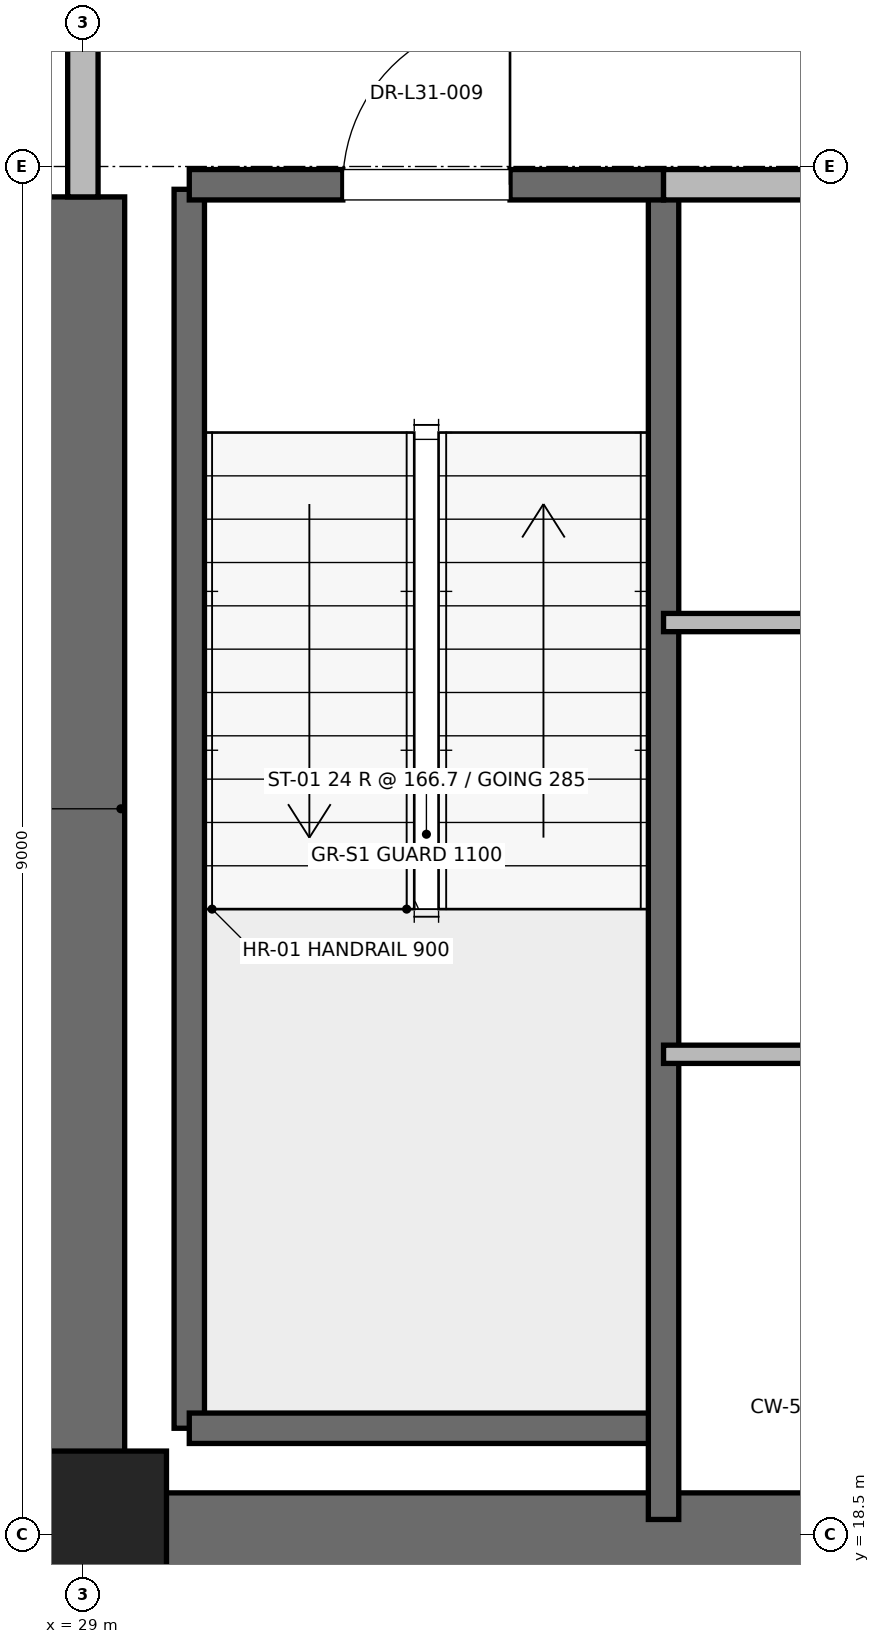
"""IFC4 building model, lengths in metres.
Left out: names, types, materials, properties, quantities, classifications, styles, units other than length and angle.
Written with IfcOpenShell. Run it as: python <this file> out.ifc"""

import sys

from ifc_helpers import new_model, si_unit, direction, frame, frame_2d, origin, origin_2d, place, context, subcontext, project, spatial, rectangle, extrude, element, fill, save


model = new_model("IFC4")
c1 = context("Model", 3, precision=1e-05, world=origin(), true_north=direction((0.0, 1.0)))
c2 = subcontext(c1, "Body", "Model", "MODEL_VIEW")
j1 = project(units=[si_unit("LENGTHUNIT", "METRE"), si_unit("PLANEANGLEUNIT", "RADIAN")], contexts=[c1])
p1 = place(None, origin())
s1 = spatial("IfcSite", under=j1, at=p1, CompositionType="ELEMENT")
p2 = place(p1, origin())
s2 = spatial("IfcBuilding", under=s1, at=p2, CompositionType="ELEMENT")
p3 = place(p2, frame((0.0, 0.0, 136.4)))
s3 = spatial("IfcBuildingStorey", under=s2, at=p3, CompositionType="ELEMENT", Elevation=136.4)
p4 = place(p3, frame((29.0, 18.5, 0.0), z_axis=(0.0, 0.0, 1.0), x_axis=(1.0, 0.0, 0.0)))
e1 = element("IfcColumn", 1, at=p4, inside=s3, PredefinedType="PILASTER", context=c2, shape_type="SweptSolid", body=[
    extrude(rectangle(XDim=1.1, YDim=1.1, at=origin_2d()), origin(), (0.0, 0.0, 1.0), 4.0),
])
p5 = place(p3, frame((29.0, 18.5, 0.0), z_axis=(0.0, 0.0, 1.0), x_axis=(1.0, 0.0, 0.0)))
e2 = element("IfcWall", 2, at=p5, inside=s3, PredefinedType="SHEAR", context=c2, shape_type="SweptSolid", body=[
    extrude(rectangle(XDim=9.2, YDim=0.55, at=frame_2d((4.6, 0.0))), origin(), (0.0, 0.0, 1.0), 3.775),
])
p6 = place(p3, frame((29.0, 18.5, 0.0), z_axis=(0.0, 0.0, 1.0), x_axis=(0.0, 1.0, 0.0)))
e3 = element("IfcWall", 3, at=p6, inside=s3, PredefinedType="SHEAR", context=c2, shape_type="SweptSolid", body=[
    extrude(rectangle(XDim=8.8, YDim=0.55, at=frame_2d((4.4, 0.0))), origin(), (0.0, 0.0, 1.0), 3.775),
])
p7 = place(p3, frame((29.7, 19.2, 0.0), z_axis=(0.0, 0.0, 1.0), x_axis=(0.0, 1.0, 0.0)))
e4 = element("IfcWall", 4, at=p7, inside=s3, PredefinedType="SOLIDWALL", context=c2, shape_type="SweptSolid", body=[
    extrude(rectangle(XDim=8.15, YDim=0.2, at=frame_2d((4.075, 0.0))), origin(), (0.0, 0.0, 1.0), 3.775),
])
p8 = place(p3, frame((29.7, 19.2, 0.0), z_axis=(0.0, 0.0, 1.0), x_axis=(1.0, 0.0, 0.0)))
e5 = element("IfcWall", 5, at=p8, inside=s3, PredefinedType="SOLIDWALL", context=c2, shape_type="SweptSolid", body=[
    extrude(rectangle(XDim=3.12, YDim=0.2, at=frame_2d((1.56, 0.0))), origin(), (0.0, 0.0, 1.0), 3.775),
])
p9 = place(p3, frame((32.82, 18.6, 0.0), z_axis=(0.0, 0.0, 1.0), x_axis=(0.0, 1.0, 0.0)))
e6 = element("IfcWall", 6, at=p9, inside=s3, PredefinedType="SOLIDWALL", context=c2, shape_type="SweptSolid", body=[
    extrude(rectangle(XDim=8.78, YDim=0.2, at=frame_2d((4.39, 0.0))), origin(), (0.0, 0.0, 1.0), 3.775),
])
p10 = place(p3, frame((29.7, 27.38, 0.0), z_axis=(0.0, 0.0, 1.0), x_axis=(1.0, 0.0, 0.0)))
e7 = element("IfcWall", 7, at=p10, inside=s3, PredefinedType="SOLIDWALL", context=c2, shape_type="SweptSolid", body=[
    extrude(rectangle(XDim=3.12, YDim=0.2, at=frame_2d((1.56, 0.0))), origin(), (0.0, 0.0, 1.0), 3.775),
])
p11 = place(p10, frame((1.01, 0.0, 0.0)))
e8 = element("IfcOpeningElement", 8, at=p11, cuts=e7, PredefinedType="OPENING", context=c2, shape_type="SweptSolid", body=[
    extrude(rectangle(XDim=1.1, YDim=2.15, at=frame_2d((0.55, 1.075))), frame((0.0, 0.1, 0.0), z_axis=(0.0, -1.0, 0.0), x_axis=(1.0, 0.0, 0.0)), (0.0, 0.0, 1.0), 0.2),
])
p12 = place(p3, frame((29.0, 27.3, 0.0), z_axis=(0.0, 0.0, 1.0), x_axis=(0.0, 1.0, 0.0)))
e9 = element("IfcWall", 9, at=p12, inside=s3, PredefinedType="PARTITIONING", context=c2, shape_type="SweptSolid", body=[
    extrude(rectangle(XDim=3.4, YDim=0.2, at=frame_2d((1.7, 0.0))), origin(), (0.0, 0.0, 1.0), 2.755),
])
p13 = place(p12, frame((1.125, 0.0, 0.0)))
e10 = element("IfcOpeningElement", 10, at=p13, cuts=e9, PredefinedType="OPENING", context=c2, shape_type="SweptSolid", body=[
    extrude(rectangle(XDim=1.15, YDim=2.2, at=frame_2d((0.575, 1.1))), frame((0.0, 0.1, 0.0), z_axis=(0.0, -1.0, 0.0), x_axis=(1.0, 0.0, 0.0)), (0.0, 0.0, 1.0), 0.2),
])
p14 = place(p3, frame((32.82, 27.38, 0.0), z_axis=(0.0, 0.0, 1.0), x_axis=(1.0, 0.0, 0.0)))
e11 = element("IfcWall", 11, at=p14, inside=s3, PredefinedType="PARTITIONING", context=c2, shape_type="SweptSolid", body=[
    extrude(rectangle(XDim=5.62, YDim=0.2, at=frame_2d((2.81, 0.0))), origin(), (0.0, 0.0, 1.0), 3.775),
])
for number, where, z_axis, x_axis in (
    (12, (32.82, 21.66, 0.0), (0.0, 0.0, 1.0), (1.0, 0.0, 0.0)),
    (13, (32.82, 24.5, 0.0), (0.0, 0.0, 1.0), (1.0, 0.0, 0.0)),
):
    element("IfcWall", number, at=place(p3, frame(where, z_axis=z_axis, x_axis=x_axis)), inside=s3, PredefinedType="PARTITIONING", context=c2, shape_type="SweptSolid", body=[
        extrude(rectangle(XDim=5.23, YDim=0.12, at=frame_2d((2.615, 0.0))), origin(), (0.0, 0.0, 1.0), 2.85),
    ])
p15 = place(p11, origin())
e14 = element("IfcDoor", 14, at=p15, inside=s3, OperationType="SINGLE_SWING_RIGHT", PredefinedType="DOOR", context=c2, shape_type="SweptSolid", body=[
    extrude(rectangle(XDim=1.1, YDim=2.15, at=frame_2d((0.55, 1.075))), frame((0.0, 0.025, 0.0), z_axis=(0.0, -1.0, 0.0), x_axis=(1.0, 0.0, 0.0)), (0.0, 0.0, 1.0), 0.05),
])
fill(e8, e14)
save(model, sys.argv[1])
